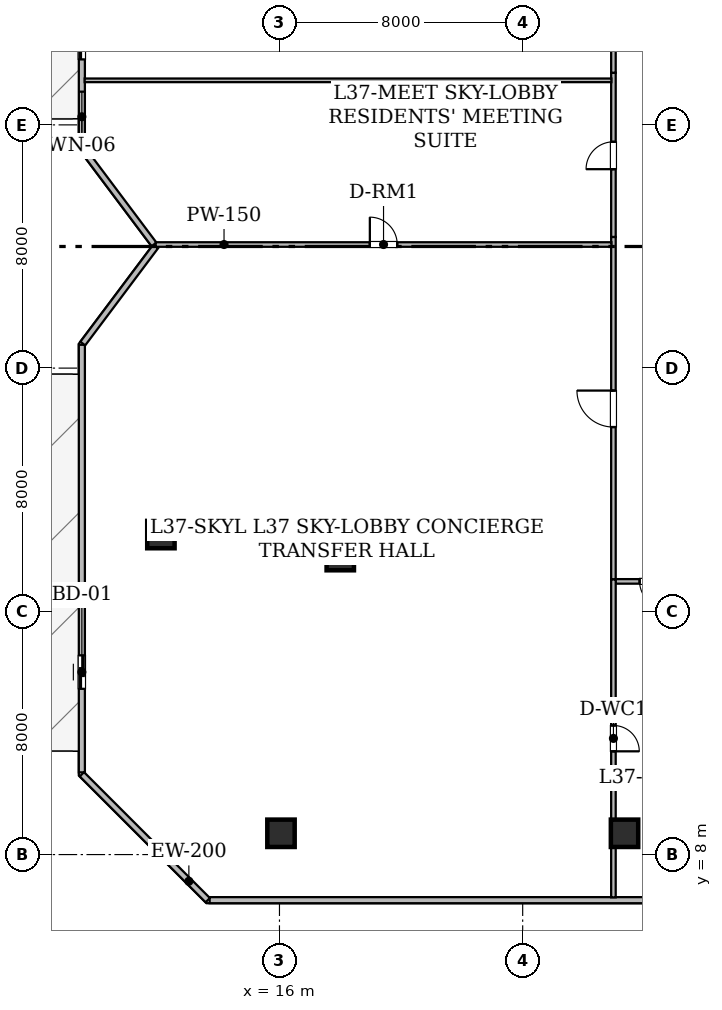
"""IFC4 building model, lengths in metres.
Left out: names, types, materials, properties, quantities, classifications, styles, units other than length and angle.
Written with IfcOpenShell. Run it as: python <this file> out.ifc"""

import sys

from ifc_helpers import new_model, si_unit, direction, frame, frame_2d, origin, origin_2d, place, context, subcontext, project, spatial, rectangle, hollow_rectangle, extrude, element, fill, save


model = new_model("IFC4")
c1 = context("Model", 3, precision=1e-05, world=origin(), true_north=direction((0.0, 1.0)))
c2 = subcontext(c1, "Body", "Model", "MODEL_VIEW")
j1 = project(units=[si_unit("LENGTHUNIT", "METRE"), si_unit("PLANEANGLEUNIT", "RADIAN")], contexts=[c1])
p1 = place(None, origin())
s1 = spatial("IfcSite", under=j1, at=p1, CompositionType="ELEMENT")
p2 = place(p1, origin())
s2 = spatial("IfcBuilding", under=s1, at=p2, CompositionType="ELEMENT")
p3 = place(p2, frame((0.0, 0.0, 145.7)))
s3 = spatial("IfcBuildingStorey", under=s2, at=p3, CompositionType="ELEMENT", Elevation=145.7)
for number, where, z_axis, x_axis in (
    (1, (16.05, 8.7, 0.0), (0.0, 0.0, 1.0), (1.0, 0.0, 0.0)),
    (2, (27.35, 8.7, 0.0), (0.0, 0.0, 1.0), (1.0, 0.0, 0.0)),
    (3, (12.1, 18.525, 0.0), (0.0, 0.0, 1.0), (1.0, 0.0, 0.0)),
    (4, (18.0, 17.8, 0.0), (0.0, 0.0, 1.0), (1.0, 0.0, 0.0)),
):
    element("IfcColumn", number, at=place(p3, frame(where, z_axis=z_axis, x_axis=x_axis)), inside=s3, PredefinedType="COLUMN", context=c2, shape_type="SweptSolid", body=[
        extrude(hollow_rectangle(XDim=0.9, YDim=0.9, WallThickness=0.045, at=origin_2d()), origin(), (0.0, 0.0, 1.0), 4.8),
    ])
p4 = place(p3, frame((13.641, 6.5, 0.0), z_axis=(0.0, 0.0, 1.0), x_axis=(-0.707106781187, 0.707106781187, 0.0)))
e5 = element("IfcWall", 5, at=p4, inside=s3, PredefinedType="STANDARD", context=c2, shape_type="SweptSolid", body=[
    extrude(rectangle(XDim=5.856, YDim=0.2, at=frame_2d((2.928, 0.0))), origin(), (0.0, 0.0, 1.0), 4.48),
])
p5 = place(p3, frame((9.5, 10.704, 0.0), z_axis=(0.0, 0.0, 1.0), x_axis=(0.0, 1.0, 0.0)))
e6 = element("IfcWall", 6, at=p5, inside=s3, PredefinedType="STANDARD", context=c2, shape_type="SweptSolid", body=[
    extrude(rectangle(XDim=14.063, YDim=0.2, at=frame_2d((7.031, 0.0))), origin(), (0.0, 0.0, 1.0), 4.48),
])
p6 = place(p5, frame((2.748, 0.0, 0.0)))
e7 = element("IfcOpeningElement", 7, at=p6, cuts=e6, PredefinedType="OPENING", context=c2, shape_type="SweptSolid", body=[
    extrude(rectangle(XDim=1.1, YDim=2.2, at=frame_2d((0.55, 1.1))), frame((0.0, 0.11, 0.0), z_axis=(0.0, -1.0, 0.0), x_axis=(1.0, 0.0, 0.0)), (0.0, 0.0, 1.0), 0.22),
])
p7 = place(p3, frame((9.53, 24.807, 0.0), z_axis=(0.0, 0.0, 1.0), x_axis=(0.600029358831, 0.799977980035, 0.0)))
e8 = element("IfcWall", 8, at=p7, inside=s3, PredefinedType="STANDARD", context=c2, shape_type="SweptSolid", body=[
    extrude(rectangle(XDim=3.991, YDim=0.2, at=frame_2d((1.996, 0.0))), origin(), (0.0, 0.0, 1.0), 4.48),
])
p8 = place(p3, frame((11.873, 28.069, 0.0), z_axis=(0.0, 0.0, 1.0), x_axis=(-0.600029630681, 0.799977776132, 0.0)))
e9 = element("IfcWall", 9, at=p8, inside=s3, PredefinedType="STANDARD", context=c2, shape_type="SweptSolid", body=[
    extrude(rectangle(XDim=3.955, YDim=0.2, at=frame_2d((1.978, 0.0))), origin(), (0.0, 0.0, 1.0), 4.48),
])
p9 = place(p3, frame((9.5, 31.284, 0.0), z_axis=(0.0, 0.0, 1.0), x_axis=(0.0, 1.0, 0.0)))
e10 = element("IfcWall", 10, at=p9, inside=s3, PredefinedType="STANDARD", context=c2, shape_type="SweptSolid", body=[
    extrude(rectangle(XDim=14.075, YDim=0.2, at=frame_2d((7.038, 0.0))), origin(), (0.0, 0.0, 1.0), 4.48),
])
p10 = place(p9, frame((2.869, 0.0, 0.0)))
e11 = element("IfcOpeningElement", 11, at=p10, cuts=e10, PredefinedType="OPENING", context=c2, shape_type="SweptSolid", body=[
    extrude(rectangle(XDim=1.1, YDim=2.2, at=frame_2d((0.55, 1.1))), frame((0.0, 0.11, 0.0), z_axis=(0.0, -1.0, 0.0), x_axis=(1.0, 0.0, 0.0)), (0.0, 0.0, 1.0), 0.22),
])
p11 = place(p9, frame((0.158, 0.0, 0.85)))
e12 = element("IfcOpeningElement", 12, at=p11, cuts=e10, PredefinedType="OPENING", context=c2, shape_type="SweptSolid", body=[
    extrude(rectangle(XDim=1.65, YDim=1.55, at=frame_2d((0.825, 0.775))), frame((0.0, 0.11, 0.0), z_axis=(0.0, -1.0, 0.0), x_axis=(1.0, 0.0, 0.0)), (0.0, 0.0, 1.0), 0.22),
])
p12 = place(p3, frame((52.296, 6.5, 0.0), z_axis=(0.0, 0.0, 1.0), x_axis=(-1.0, 0.0, 0.0)))
e13 = element("IfcWall", 13, at=p12, inside=s3, PredefinedType="STANDARD", context=c2, shape_type="SweptSolid", body=[
    extrude(rectangle(XDim=38.593, YDim=0.2, at=frame_2d((19.296, 0.0))), origin(), (0.0, 0.0, 1.0), 4.48),
])
p13 = place(p12, frame((12.808, 0.0, 0.9)))
e14 = element("IfcOpeningElement", 14, at=p13, cuts=e13, PredefinedType="OPENING", context=c2, shape_type="SweptSolid", body=[
    extrude(rectangle(XDim=1.95, YDim=1.65, at=frame_2d((0.975, 0.825))), frame((0.0, 0.11, 0.0), z_axis=(0.0, -1.0, 0.0), x_axis=(1.0, 0.0, 0.0)), (0.0, 0.0, 1.0), 0.22),
])
p14 = place(p3, frame((26.985, 17.05, 0.0), z_axis=(0.0, 0.0, 1.0), x_axis=(0.0, 1.0, 0.0)))
e15 = element("IfcWall", 15, at=p14, inside=s3, PredefinedType="STANDARD", context=c2, shape_type="SweptSolid", body=[
    extrude(rectangle(XDim=11.264, YDim=0.15, at=frame_2d((5.632, 0.0))), origin(), (0.0, 0.0, 1.0), 3.775),
])
p15 = place(p14, frame((5.011, 0.0, 0.0)))
e16 = element("IfcOpeningElement", 16, at=p15, cuts=e15, PredefinedType="OPENING", context=c2, shape_type="SweptSolid", body=[
    extrude(rectangle(XDim=1.2, YDim=2.15, at=frame_2d((0.6, 1.075))), frame((0.0, 0.085, 0.0), z_axis=(0.0, -1.0, 0.0), x_axis=(1.0, 0.0, 0.0)), (0.0, 0.0, 1.0), 0.17),
])
p16 = place(p3, frame((26.985, 28.314, 0.0), z_axis=(0.0, 0.0, 1.0), x_axis=(0.0, 1.0, 0.0)))
e17 = element("IfcWall", 17, at=p16, inside=s3, PredefinedType="STANDARD", context=c2, shape_type="SweptSolid", body=[
    extrude(rectangle(XDim=5.4, YDim=0.15, at=frame_2d((2.7, 0.0))), origin(), (0.0, 0.0, 1.0), 4.48),
])
p17 = place(p16, frame((2.229, 0.0, 0.0)))
e18 = element("IfcOpeningElement", 18, at=p17, cuts=e17, PredefinedType="OPENING", context=c2, shape_type="SweptSolid", body=[
    extrude(rectangle(XDim=0.9, YDim=2.1, at=frame_2d((0.45, 1.05))), frame((0.0, 0.085, 0.0), z_axis=(0.0, -1.0, 0.0), x_axis=(1.0, 0.0, 0.0)), (0.0, 0.0, 1.0), 0.17),
])
p18 = place(p3, frame((26.985, 33.714, 0.0), z_axis=(0.0, 0.0, 1.0), x_axis=(0.0, 1.0, 0.0)))
e19 = element("IfcWall", 19, at=p18, inside=s3, PredefinedType="STANDARD", context=c2, shape_type="SweptSolid", body=[
    extrude(rectangle(XDim=5.236, YDim=0.15, at=frame_2d((2.618, 0.0))), origin(), (0.0, 0.0, 1.0), 3.775),
])
p19 = place(p18, frame((2.043, 0.0, 0.0)))
e20 = element("IfcOpeningElement", 20, at=p19, cuts=e19, PredefinedType="OPENING", context=c2, shape_type="SweptSolid", body=[
    extrude(rectangle(XDim=1.15, YDim=2.2, at=frame_2d((0.575, 1.1))), frame((0.0, 0.085, 0.0), z_axis=(0.0, -1.0, 0.0), x_axis=(1.0, 0.0, 0.0)), (0.0, 0.0, 1.0), 0.17),
])
p20 = place(p3, frame((29.534, 16.985, 0.0), z_axis=(0.0, 0.0, 1.0), x_axis=(-1.0, 0.0, 0.0)))
e21 = element("IfcWall", 21, at=p20, inside=s3, PredefinedType="STANDARD", context=c2, shape_type="SweptSolid", body=[
    extrude(rectangle(XDim=2.484, YDim=0.15, at=frame_2d((1.242, 0.0))), origin(), (0.0, 0.0, 1.0), 3.775),
])
p21 = place(p20, frame((0.838, 0.0, 0.0)))
e22 = element("IfcOpeningElement", 22, at=p21, cuts=e21, PredefinedType="OPENING", context=c2, shape_type="SweptSolid", body=[
    extrude(rectangle(XDim=0.85, YDim=2.1, at=frame_2d((0.425, 1.05))), frame((0.0, 0.085, 0.0), z_axis=(0.0, -1.0, 0.0), x_axis=(1.0, 0.0, 0.0)), (0.0, 0.0, 1.0), 0.17),
])
p22 = place(p3, frame((11.928, 28.065, 0.0), z_axis=(0.0, 0.0, 1.0), x_axis=(1.0, 0.0, 0.0)))
e23 = element("IfcWall", 23, at=p22, inside=s3, PredefinedType="STANDARD", context=c2, shape_type="SweptSolid", body=[
    extrude(rectangle(XDim=14.99, YDim=0.15, at=frame_2d((7.495, 0.0))), origin(), (0.0, 0.0, 1.0), 3.775),
])
p23 = place(p22, frame((7.045, 0.0, 0.0)))
e24 = element("IfcOpeningElement", 24, at=p23, cuts=e23, PredefinedType="OPENING", context=c2, shape_type="SweptSolid", body=[
    extrude(rectangle(XDim=0.9, YDim=2.1, at=frame_2d((0.45, 1.05))), frame((0.0, 0.085, 0.0), z_axis=(0.0, -1.0, 0.0), x_axis=(1.0, 0.0, 0.0)), (0.0, 0.0, 1.0), 0.17),
])
p24 = place(p3, frame((26.985, 17.05, 0.0), z_axis=(0.0, 0.0, 1.0), x_axis=(0.0, -1.0, 0.0)))
e25 = element("IfcWall", 25, at=p24, inside=s3, PredefinedType="STANDARD", context=c2, shape_type="SweptSolid", body=[
    extrude(rectangle(XDim=10.458, YDim=0.15, at=frame_2d((5.229, 0.0))), origin(), (0.0, 0.0, 1.0), 3.775),
])
p25 = place(p24, frame((4.804, 0.0, 0.0)))
e26 = element("IfcOpeningElement", 26, at=p25, cuts=e25, PredefinedType="OPENING", context=c2, shape_type="SweptSolid", body=[
    extrude(rectangle(XDim=0.85, YDim=2.1, at=frame_2d((0.425, 1.05))), frame((0.0, 0.085, 0.0), z_axis=(0.0, -1.0, 0.0), x_axis=(1.0, 0.0, 0.0)), (0.0, 0.0, 1.0), 0.17),
])
p26 = place(p3, frame((9.592, 33.465, 0.0), z_axis=(0.0, 0.0, 1.0), x_axis=(1.0, 0.0, 0.0)))
e27 = element("IfcWall", 27, at=p26, inside=s3, PredefinedType="PARTITIONING", context=c2, shape_type="SweptSolid", body=[
    extrude(rectangle(XDim=17.326, YDim=0.12, at=frame_2d((8.663, 0.0))), origin(), (0.0, 0.0, 1.0), 3.775),
])
p27 = place(p6, origin())
e28 = element("IfcDoor", 28, at=p27, inside=s3, OperationType="SLIDING_TO_LEFT", PredefinedType="DOOR", context=c2, shape_type="SweptSolid", body=[
    extrude(rectangle(XDim=1.1, YDim=2.2, at=frame_2d((0.55, 1.1))), frame((0.0, 0.025, 0.0), z_axis=(0.0, -1.0, 0.0), x_axis=(1.0, 0.0, 0.0)), (0.0, 0.0, 1.0), 0.05),
])
fill(e7, e28)
p28 = place(p10, origin())
e29 = element("IfcDoor", 29, at=p28, inside=s3, OperationType="SLIDING_TO_LEFT", PredefinedType="DOOR", context=c2, shape_type="SweptSolid", body=[
    extrude(rectangle(XDim=1.1, YDim=2.2, at=frame_2d((0.55, 1.1))), frame((0.0, 0.025, 0.0), z_axis=(0.0, -1.0, 0.0), x_axis=(1.0, 0.0, 0.0)), (0.0, 0.0, 1.0), 0.05),
])
fill(e11, e29)
p29 = place(p11, origin())
e30 = element("IfcWindow", 30, at=p29, inside=s3, PartitioningType="SINGLE_PANEL", PredefinedType="WINDOW", context=c2, shape_type="SweptSolid", body=[
    extrude(rectangle(XDim=1.65, YDim=1.55, at=frame_2d((0.825, 0.775))), frame((0.0, 0.03, 0.0), z_axis=(0.0, -1.0, 0.0), x_axis=(1.0, 0.0, 0.0)), (0.0, 0.0, 1.0), 0.06),
])
fill(e12, e30)
p30 = place(p15, origin())
e31 = element("IfcDoor", 31, at=p30, inside=s3, OperationType="SINGLE_SWING_RIGHT", PredefinedType="DOOR", context=c2, shape_type="SweptSolid", body=[
    extrude(rectangle(XDim=1.2, YDim=2.15, at=frame_2d((0.6, 1.075))), frame((0.0, 0.025, 0.0), z_axis=(0.0, -1.0, 0.0), x_axis=(1.0, 0.0, 0.0)), (0.0, 0.0, 1.0), 0.05),
])
fill(e16, e31)
p31 = place(p17, origin())
e32 = element("IfcDoor", 32, at=p31, inside=s3, OperationType="SINGLE_SWING_LEFT", PredefinedType="DOOR", context=c2, shape_type="SweptSolid", body=[
    extrude(rectangle(XDim=0.9, YDim=2.1, at=frame_2d((0.45, 1.05))), frame((0.0, 0.025, 0.0), z_axis=(0.0, -1.0, 0.0), x_axis=(1.0, 0.0, 0.0)), (0.0, 0.0, 1.0), 0.05),
])
fill(e18, e32)
p32 = place(p21, origin())
e33 = element("IfcDoor", 33, at=p32, inside=s3, OperationType="SINGLE_SWING_LEFT", PredefinedType="DOOR", context=c2, shape_type="SweptSolid", body=[
    extrude(rectangle(XDim=0.85, YDim=2.1, at=frame_2d((0.425, 1.05))), frame((0.0, 0.025, 0.0), z_axis=(0.0, -1.0, 0.0), x_axis=(1.0, 0.0, 0.0)), (0.0, 0.0, 1.0), 0.05),
])
fill(e22, e33)
p33 = place(p23, origin())
e34 = element("IfcDoor", 34, at=p33, inside=s3, OperationType="SINGLE_SWING_LEFT", PredefinedType="DOOR", context=c2, shape_type="SweptSolid", body=[
    extrude(rectangle(XDim=0.9, YDim=2.1, at=frame_2d((0.45, 1.05))), frame((0.0, 0.025, 0.0), z_axis=(0.0, -1.0, 0.0), x_axis=(1.0, 0.0, 0.0)), (0.0, 0.0, 1.0), 0.05),
])
fill(e24, e34)
p34 = place(p25, origin())
e35 = element("IfcDoor", 35, at=p34, inside=s3, OperationType="SINGLE_SWING_RIGHT", PredefinedType="DOOR", context=c2, shape_type="SweptSolid", body=[
    extrude(rectangle(XDim=0.85, YDim=2.1, at=frame_2d((0.425, 1.05))), frame((0.0, 0.025, 0.0), z_axis=(0.0, -1.0, 0.0), x_axis=(1.0, 0.0, 0.0)), (0.0, 0.0, 1.0), 0.05),
])
fill(e26, e35)
save(model, sys.argv[1])
